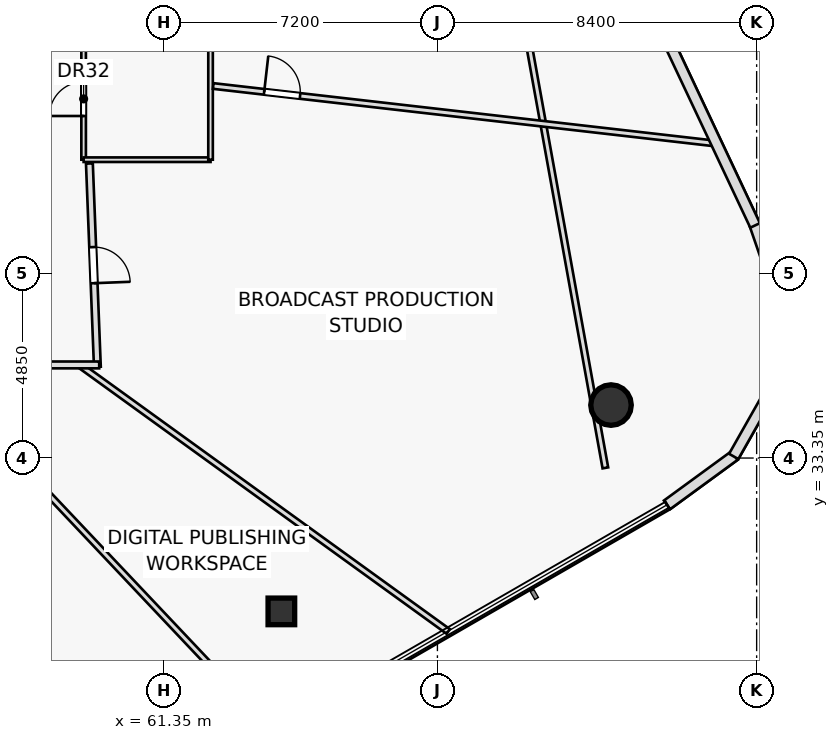
"""IFC4 building model, lengths in metres.
Left out: names, types, materials, properties, quantities, classifications, styles, units other than length and angle.
Written with IfcOpenShell. Run it as: python <this file> out.ifc"""

import sys

from ifc_helpers import new_model, si_unit, direction, frame, frame_2d, origin, origin_2d, place, context, subcontext, project, spatial, rectangle, hollow_rectangle, hollow_circle, extrude, element, fill, save


model = new_model("IFC4")
c1 = context("Model", 3, precision=1e-05, world=origin(), true_north=direction((0.0, 1.0)))
c2 = subcontext(c1, "Body", "Model", "MODEL_VIEW")
j1 = project(units=[si_unit("LENGTHUNIT", "METRE"), si_unit("PLANEANGLEUNIT", "RADIAN")], contexts=[c1])
p1 = place(None, origin())
s1 = spatial("IfcSite", under=j1, at=p1, CompositionType="ELEMENT")
p2 = place(p1, origin())
s2 = spatial("IfcBuilding", under=s1, at=p2, CompositionType="ELEMENT")
p3 = place(p2, frame((0.0, 0.0, 78.3)))
s3 = spatial("IfcBuildingStorey", under=s2, at=p3, CompositionType="ELEMENT", Elevation=78.3)
p4 = place(p3, frame((64.444, 29.315, 0.0), z_axis=(0.0, 0.0, 1.0), x_axis=(1.0, 0.0, 0.0)))
e1 = element("IfcColumn", 1, at=p4, inside=s3, PredefinedType="COLUMN", context=c2, shape_type="SweptSolid", body=[
    extrude(hollow_rectangle(XDim=0.7, YDim=0.7, WallThickness=0.04, at=origin_2d()), origin(), (0.0, 0.0, 1.0), 3.6),
])
p5 = place(p3, frame((73.118, 34.744, 0.0), z_axis=(0.0, 0.0, 1.0), x_axis=(1.0, 0.0, 0.0)))
e2 = element("IfcColumn", 2, at=p5, inside=s3, PredefinedType="COLUMN", context=c2, shape_type="SweptSolid", body=[
    extrude(hollow_circle(Radius=0.533, WallThickness=0.045, at=origin_2d()), origin(), (0.0, 0.0, 1.0), 3.6),
])
p6 = place(p3, frame((72.969, 33.091, 0.0), z_axis=(0.0, 0.0, 1.0), x_axis=(-0.177742578179, 0.984077017261, 0.0)))
e3 = element("IfcWall", 3, at=p6, inside=s3, PredefinedType="PARTITIONING", context=c2, shape_type="SweptSolid", body=[
    extrude(rectangle(XDim=13.179, YDim=0.15, at=frame_2d((6.59, 0.0))), origin(), (0.0, 0.0, 1.0), 2.975),
])
p7 = place(p3, frame((59.24, 41.2, 0.0), z_axis=(0.0, 0.0, 1.0), x_axis=(0.0, 1.0, 0.0)))
e4 = element("IfcWall", 4, at=p7, inside=s3, PredefinedType="PARTITIONING", context=c2, shape_type="SweptSolid", body=[
    extrude(rectangle(XDim=7.0, YDim=0.12, at=frame_2d((3.5, 0.0))), origin(), (0.0, 0.0, 1.0), 3.6),
])
p8 = place(p7, frame((1.15, 0.0, 0.0)))
e5 = element("IfcOpeningElement", 5, at=p8, cuts=e4, PredefinedType="OPENING", context=c2, shape_type="SweptSolid", body=[
    extrude(rectangle(XDim=0.9, YDim=2.05, at=frame_2d((0.45, 1.025))), frame((0.0, 0.07, 0.0), z_axis=(0.0, -1.0, 0.0), x_axis=(1.0, 0.0, 0.0)), (0.0, 0.0, 1.0), 0.14),
])
p9 = place(p7, frame((4.7, 0.0, 0.0)))
e6 = element("IfcOpeningElement", 6, at=p9, cuts=e4, PredefinedType="OPENING", context=c2, shape_type="SweptSolid", body=[
    extrude(rectangle(XDim=0.9, YDim=2.05, at=frame_2d((0.45, 1.025))), frame((0.0, 0.07, 0.0), z_axis=(0.0, -1.0, 0.0), x_axis=(1.0, 0.0, 0.0)), (0.0, 0.0, 1.0), 0.14),
])
p10 = place(p3, frame((59.24, 41.2, 0.0), z_axis=(0.0, 0.0, 1.0), x_axis=(1.0, 0.0, 0.0)))
e7 = element("IfcWall", 7, at=p10, inside=s3, PredefinedType="PARTITIONING", context=c2, shape_type="SweptSolid", body=[
    extrude(rectangle(XDim=3.34, YDim=0.12, at=frame_2d((1.67, 0.0))), origin(), (0.0, 0.0, 1.0), 2.975),
])
p11 = place(p3, frame((62.58, 41.2, 0.0), z_axis=(0.0, 0.0, 1.0), x_axis=(0.0, 1.0, 0.0)))
e8 = element("IfcWall", 8, at=p11, inside=s3, PredefinedType="PARTITIONING", context=c2, shape_type="SweptSolid", body=[
    extrude(rectangle(XDim=7.0, YDim=0.12, at=frame_2d((3.5, 0.0))), origin(), (0.0, 0.0, 1.0), 3.6),
])
p12 = place(p3, frame((55.098, 35.8, 0.0), z_axis=(0.0, 0.0, 1.0), x_axis=(0.687012477337, -0.726645619256, 0.0)))
e9 = element("IfcWall", 9, at=p12, inside=s3, PredefinedType="PARTITIONING", context=c2, shape_type="SweptSolid", body=[
    extrude(rectangle(XDim=12.844, YDim=0.15, at=frame_2d((6.422, 0.0))), origin(), (0.0, 0.0, 1.0), 2.975),
])
p13 = place(p3, frame((59.13, 35.8, 0.0), z_axis=(0.0, 0.0, 1.0), x_axis=(0.810498534466, -0.585740664141, 0.0)))
e10 = element("IfcWall", 10, at=p13, inside=s3, PredefinedType="PARTITIONING", context=c2, shape_type="SweptSolid", body=[
    extrude(rectangle(XDim=11.974, YDim=0.15, at=frame_2d((5.987, 0.0))), origin(), (0.0, 0.0, 1.0), 2.975),
])
p14 = place(p3, frame((62.65, 43.139, 0.0), z_axis=(0.0, 0.0, 1.0), x_axis=(0.993507762736, -0.113764341437, 0.0)))
e11 = element("IfcWall", 11, at=p14, inside=s3, PredefinedType="PARTITIONING", context=c2, shape_type="SweptSolid", body=[
    extrude(rectangle(XDim=13.344, YDim=0.15, at=frame_2d((6.672, 0.0))), origin(), (0.0, 0.0, 1.0), 2.975),
])
p15 = place(p14, frame((1.35, 0.0, 0.0)))
e12 = element("IfcOpeningElement", 12, at=p15, cuts=e11, PredefinedType="OPENING", context=c2, shape_type="SweptSolid", body=[
    extrude(rectangle(XDim=0.95, YDim=2.05, at=frame_2d((0.475, 1.025))), frame((0.0, 0.085, 0.0), z_axis=(0.0, -1.0, 0.0), x_axis=(1.0, 0.0, 0.0)), (0.0, 0.0, 1.0), 0.17),
])
p16 = place(p3, frame((59.392, 41.1, 0.0), z_axis=(0.0, 0.0, 1.0), x_axis=(0.03921413315, -0.999230830069, 0.0)))
e13 = element("IfcWall", 13, at=p16, inside=s3, PredefinedType="PARTITIONING", context=c2, shape_type="SweptSolid", body=[
    extrude(rectangle(XDim=5.354, YDim=0.18, at=frame_2d((2.677, 0.0))), origin(), (0.0, 0.0, 1.0), 2.975),
])
p17 = place(p16, frame((2.202, 0.0, 0.0)))
e14 = element("IfcOpeningElement", 14, at=p17, cuts=e13, PredefinedType="OPENING", context=c2, shape_type="SweptSolid", body=[
    extrude(rectangle(XDim=0.95, YDim=2.05, at=frame_2d((0.475, 1.025))), frame((0.0, 0.1, 0.0), z_axis=(0.0, -1.0, 0.0), x_axis=(1.0, 0.0, 0.0)), (0.0, 0.0, 1.0), 0.2),
])
p18 = place(p3, frame((59.65, 35.8, 0.0), z_axis=(0.0, 0.0, 1.0), x_axis=(-1.0, 0.0, 0.0)))
e15 = element("IfcWall", 15, at=p18, inside=s3, PredefinedType="PARTITIONING", context=c2, shape_type="SweptSolid", body=[
    extrude(rectangle(XDim=22.15, YDim=0.18, at=frame_2d((11.075, 0.0))), origin(), (0.0, 0.0, 1.0), 2.975),
])
p19 = place(p18, frame((1.911, 0.0, 0.0)))
e16 = element("IfcOpeningElement", 16, at=p19, cuts=e15, PredefinedType="OPENING", context=c2, shape_type="SweptSolid", body=[
    extrude(rectangle(XDim=0.95, YDim=2.05, at=frame_2d((0.475, 1.025))), frame((0.0, 0.1, 0.0), z_axis=(0.0, -1.0, 0.0), x_axis=(1.0, 0.0, 0.0)), (0.0, 0.0, 1.0), 0.2),
])
p20 = place(p18, frame((8.314, 0.0, 0.0)))
e17 = element("IfcOpeningElement", 17, at=p20, cuts=e15, PredefinedType="OPENING", context=c2, shape_type="SweptSolid", body=[
    extrude(rectangle(XDim=0.95, YDim=2.05, at=frame_2d((0.475, 1.025))), frame((0.0, 0.1, 0.0), z_axis=(0.0, -1.0, 0.0), x_axis=(1.0, 0.0, 0.0)), (0.0, 0.0, 1.0), 0.2),
])
p21 = place(p18, frame((15.147, 0.0, 0.0)))
e18 = element("IfcOpeningElement", 18, at=p21, cuts=e15, PredefinedType="OPENING", context=c2, shape_type="SweptSolid", body=[
    extrude(rectangle(XDim=0.95, YDim=2.05, at=frame_2d((0.475, 1.025))), frame((0.0, 0.1, 0.0), z_axis=(0.0, -1.0, 0.0), x_axis=(1.0, 0.0, 0.0)), (0.0, 0.0, 1.0), 0.2),
])
p22 = place(p18, frame((19.517, 0.0, 0.0)))
e19 = element("IfcOpeningElement", 19, at=p22, cuts=e15, PredefinedType="OPENING", context=c2, shape_type="SweptSolid", body=[
    extrude(rectangle(XDim=0.95, YDim=2.05, at=frame_2d((0.475, 1.025))), frame((0.0, 0.1, 0.0), z_axis=(0.0, -1.0, 0.0), x_axis=(1.0, 0.0, 0.0)), (0.0, 0.0, 1.0), 0.2),
])
p23 = place(p3, frame((74.592, 32.118, 0.0), z_axis=(0.0, 0.0, 1.0), x_axis=(0.807446100246, 0.589941348948, 0.0)))
e20 = element("IfcWall", 20, at=p23, inside=s3, PredefinedType="STANDARD", context=c2, shape_type="SweptSolid", body=[
    extrude(rectangle(XDim=2.197, YDim=0.28, at=frame_2d((1.098, 0.0))), origin(), (0.0, 0.0, 1.0), 3.6),
])
p24 = place(p3, frame((76.346, 33.392, 0.0), z_axis=(0.0, 0.0, 1.0), x_axis=(0.493091508844, 0.869977450228, 0.0)))
e21 = element("IfcWall", 21, at=p24, inside=s3, PredefinedType="STANDARD", context=c2, shape_type="SweptSolid", body=[
    extrude(rectangle(XDim=2.185, YDim=0.28, at=frame_2d((1.093, 0.0))), origin(), (0.0, 0.0, 1.0), 3.6),
])
p25 = place(p3, frame((77.618, 37.412, 0.0), z_axis=(0.0, 0.0, 1.0), x_axis=(-0.326396284493, 0.945233021783, 0.0)))
e22 = element("IfcWall", 22, at=p25, inside=s3, PredefinedType="STANDARD", context=c2, shape_type="SweptSolid", body=[
    extrude(rectangle(XDim=2.207, YDim=0.28, at=frame_2d((1.104, 0.0))), origin(), (0.0, 0.0, 1.0), 3.6),
])
p26 = place(p3, frame((76.909, 39.471, 0.0), z_axis=(0.0, 0.0, 1.0), x_axis=(-0.426150605753, 0.904652232196, 0.0)))
e23 = element("IfcWall", 23, at=p26, inside=s3, PredefinedType="STANDARD", context=c2, shape_type="SweptSolid", body=[
    extrude(rectangle(XDim=8.446, YDim=0.28, at=frame_2d((4.223, 0.0))), origin(), (0.0, 0.0, 1.0), 3.6),
])
p27 = place(p8, origin())
e24 = element("IfcDoor", 24, at=p27, inside=s3, OperationType="SINGLE_SWING_LEFT", PredefinedType="DOOR", context=c2, shape_type="SweptSolid", body=[
    extrude(rectangle(XDim=0.9, YDim=2.05, at=frame_2d((0.45, 1.025))), frame((0.0, 0.025, 0.0), z_axis=(0.0, -1.0, 0.0), x_axis=(1.0, 0.0, 0.0)), (0.0, 0.0, 1.0), 0.05),
])
fill(e5, e24)
p28 = place(p15, origin())
e25 = element("IfcDoor", 25, at=p28, inside=s3, OperationType="SINGLE_SWING_LEFT", PredefinedType="DOOR", context=c2, shape_type="SweptSolid", body=[
    extrude(rectangle(XDim=0.95, YDim=2.05, at=frame_2d((0.475, 1.025))), frame((0.0, 0.025, 0.0), z_axis=(0.0, -1.0, 0.0), x_axis=(1.0, 0.0, 0.0)), (0.0, 0.0, 1.0), 0.05),
])
fill(e12, e25)
p29 = place(p17, origin())
e26 = element("IfcDoor", 26, at=p29, inside=s3, OperationType="SINGLE_SWING_RIGHT", PredefinedType="DOOR", context=c2, shape_type="SweptSolid", body=[
    extrude(rectangle(XDim=0.95, YDim=2.05, at=frame_2d((0.475, 1.025))), frame((0.0, 0.025, 0.0), z_axis=(0.0, -1.0, 0.0), x_axis=(1.0, 0.0, 0.0)), (0.0, 0.0, 1.0), 0.05),
])
fill(e14, e26)
save(model, sys.argv[1])
